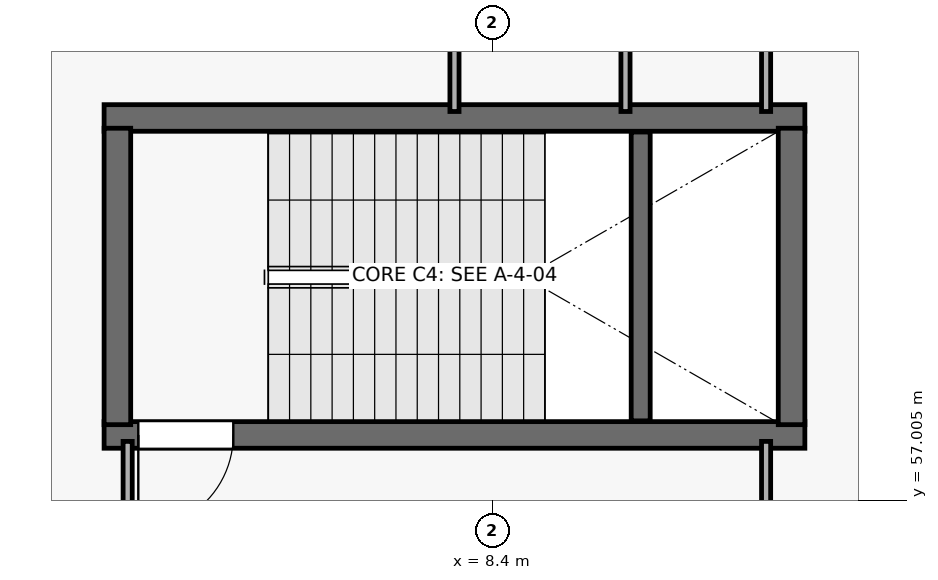
"""IFC4 building model, lengths in metres.
Left out: names, types, materials, properties, quantities, classifications, styles, units other than length and angle.
Written with IfcOpenShell. Run it as: python <this file> out.ifc"""

import sys

from ifc_helpers import new_model, si_unit, direction, frame, frame_2d, origin, place, context, subcontext, project, spatial, rectangle, extrude, element, fill, save


model = new_model("IFC4")
c1 = context("Model", 3, precision=1e-05, world=origin(), true_north=direction((0.0, 1.0)))
c2 = subcontext(c1, "Body", "Model", "MODEL_VIEW")
j1 = project(units=[si_unit("LENGTHUNIT", "METRE"), si_unit("PLANEANGLEUNIT", "RADIAN")], contexts=[c1])
p1 = place(None, origin())
s1 = spatial("IfcSite", under=j1, at=p1, CompositionType="ELEMENT")
p2 = place(p1, origin())
s2 = spatial("IfcBuilding", under=s1, at=p2, CompositionType="ELEMENT")
p3 = place(p2, frame((0.0, 0.0, 20.4)))
s3 = spatial("IfcBuildingStorey", under=s2, at=p3, CompositionType="ELEMENT", Elevation=20.4)
p4 = place(p3, frame((3.29, 57.865, 0.0), z_axis=(0.0, 0.0, 1.0), x_axis=(1.0, 0.0, 0.0)))
e1 = element("IfcWall", 1, at=p4, inside=s3, PredefinedType="SHEAR", context=c2, shape_type="SweptSolid", body=[
    extrude(rectangle(XDim=9.22, YDim=0.35, at=frame_2d((4.61, 0.0))), origin(), (0.0, 0.0, 1.0), 4.84),
])
p5 = place(p4, frame((0.45, 0.0, 0.0)))
e2 = element("IfcOpeningElement", 2, at=p5, cuts=e1, PredefinedType="OPENING", context=c2, shape_type="SweptSolid", body=[
    extrude(rectangle(XDim=1.25, YDim=2.2, at=frame_2d((0.625, 1.1))), frame((0.0, 0.185, 0.0), z_axis=(0.0, -1.0, 0.0), x_axis=(1.0, 0.0, 0.0)), (0.0, 0.0, 1.0), 0.37),
])
p6 = place(p3, frame((12.51, 62.035, 0.0), z_axis=(0.0, 0.0, 1.0), x_axis=(-1.0, 0.0, 0.0)))
e3 = element("IfcWall", 3, at=p6, inside=s3, PredefinedType="SHEAR", context=c2, shape_type="SweptSolid", body=[
    extrude(rectangle(XDim=9.22, YDim=0.35, at=frame_2d((4.61, 0.0))), origin(), (0.0, 0.0, 1.0), 4.84),
])
for number, where, z_axis, x_axis in (
    (4, (3.465, 58.0, 0.0), (0.0, 0.0, 1.0), (0.0, 1.0, 0.0)),
    (5, (12.335, 61.9, 0.0), (0.0, 0.0, 1.0), (0.0, -1.0, 0.0)),
):
    element("IfcWall", number, at=place(p3, frame(where, z_axis=z_axis, x_axis=x_axis)), inside=s3, PredefinedType="SHEAR", context=c2, shape_type="SweptSolid", body=[
        extrude(rectangle(XDim=3.9, YDim=0.35, at=frame_2d((1.95, 0.0))), origin(), (0.0, 0.0, 1.0), 4.84),
    ])
p7 = place(p3, frame((10.35, 58.05, 0.0), z_axis=(0.0, 0.0, 1.0), x_axis=(0.0, 1.0, 0.0)))
e6 = element("IfcWall", 6, at=p7, inside=s3, PredefinedType="SHEAR", context=c2, shape_type="SweptSolid", body=[
    extrude(rectangle(XDim=3.8, YDim=0.25, at=frame_2d((1.9, 0.0))), origin(), (0.0, 0.0, 1.0), 2.37),
])
for number, where, z_axis, x_axis in (
    (7, (7.9, 81.8, 0.0), (0.0, 0.0, 1.0), (0.0, -1.0, 0.0)),
    (8, (12.0, 62.12, 0.0), (0.0, 0.0, 1.0), (0.0, 1.0, 0.0)),
):
    element("IfcWall", number, at=place(p3, frame(where, z_axis=z_axis, x_axis=x_axis)), inside=s3, PredefinedType="PARTITIONING", context=c2, shape_type="SweptSolid", body=[
        extrude(rectangle(XDim=19.68, YDim=0.12, at=frame_2d((9.84, 0.0))), origin(), (0.0, 0.0, 1.0), 4.84),
    ])
p8 = place(p3, frame((10.15, 81.8, 0.0), z_axis=(0.0, 0.0, 1.0), x_axis=(0.0, -1.0, 0.0)))
e9 = element("IfcWall", 9, at=p8, inside=s3, PredefinedType="PARTITIONING", context=c2, shape_type="SweptSolid", body=[
    extrude(rectangle(XDim=19.68, YDim=0.12, at=frame_2d((9.84, 0.0))), origin(), (0.0, 0.0, 1.0), 4.84),
])
p9 = place(p8, frame((9.06, 0.0, 0.0)))
e10 = element("IfcOpeningElement", 10, at=p9, cuts=e9, PredefinedType="OPENING", context=c2, shape_type="SweptSolid", body=[
    extrude(rectangle(XDim=1.56, YDim=2.44, at=frame_2d((0.78, 1.22))), frame((0.0, 0.07, 0.0), z_axis=(0.0, -1.0, 0.0), x_axis=(1.0, 0.0, 0.0)), (0.0, 0.0, 1.0), 0.14),
])
p10 = place(p3, frame((3.6, 57.78, 0.0), z_axis=(0.0, 0.0, 1.0), x_axis=(0.0, -1.0, 0.0)))
e11 = element("IfcWall", 11, at=p10, inside=s3, PredefinedType="PARTITIONING", context=c2, shape_type="SweptSolid", body=[
    extrude(rectangle(XDim=5.18, YDim=0.12, at=frame_2d((2.59, 0.0))), origin(), (0.0, 0.0, 1.0), 4.84),
])
p11 = place(p10, frame((1.81, 0.0, 0.0)))
e12 = element("IfcOpeningElement", 12, at=p11, cuts=e11, PredefinedType="OPENING", context=c2, shape_type="SweptSolid", body=[
    extrude(rectangle(XDim=1.56, YDim=2.44, at=frame_2d((0.78, 1.22))), frame((0.0, 0.07, 0.0), z_axis=(0.0, -1.0, 0.0), x_axis=(1.0, 0.0, 0.0)), (0.0, 0.0, 1.0), 0.14),
])
p12 = place(p3, frame((12.0, 54.8, 0.0), z_axis=(0.0, 0.0, 1.0), x_axis=(0.0, 1.0, 0.0)))
e13 = element("IfcWall", 13, at=p12, inside=s3, PredefinedType="PARTITIONING", context=c2, shape_type="SweptSolid", body=[
    extrude(rectangle(XDim=2.98, YDim=0.12, at=frame_2d((1.49, 0.0))), origin(), (0.0, 0.0, 1.0), 4.84),
])
p13 = place(p5, origin())
e14 = element("IfcDoor", 14, at=p13, inside=s3, OperationType="SINGLE_SWING_RIGHT", PredefinedType="DOOR", context=c2, shape_type="SweptSolid", body=[
    extrude(rectangle(XDim=1.25, YDim=2.2, at=frame_2d((0.625, 1.1))), frame((0.0, 0.025, 0.0), z_axis=(0.0, -1.0, 0.0), x_axis=(1.0, 0.0, 0.0)), (0.0, 0.0, 1.0), 0.05),
])
fill(e2, e14)
save(model, sys.argv[1])
